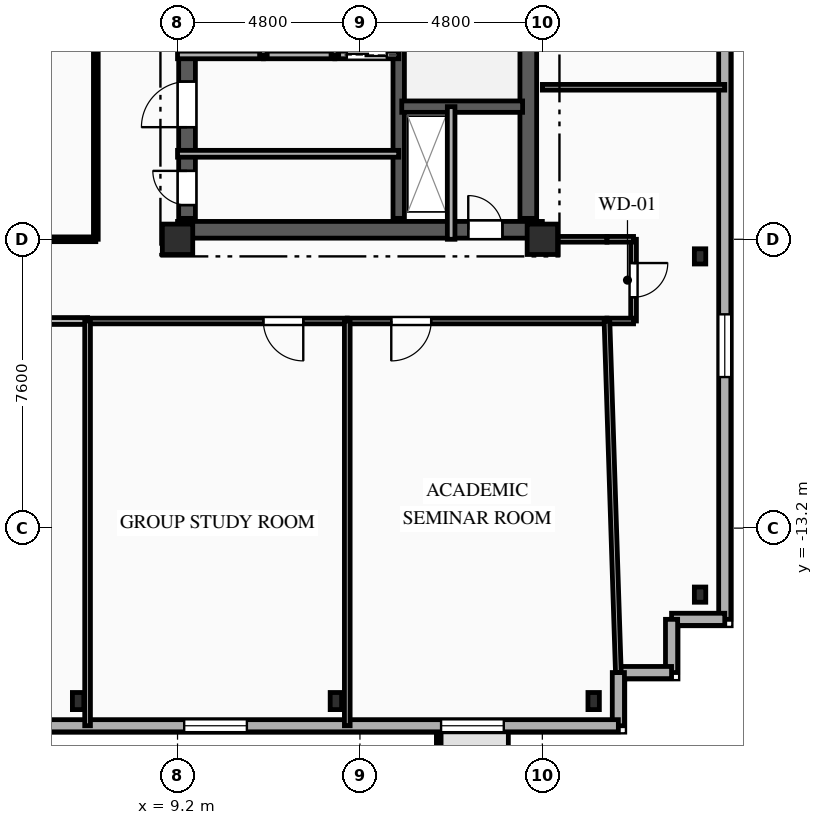
"""IFC4 building model, lengths in metres.
Left out: names, types, materials, properties, quantities, classifications, styles, units other than length and angle.
Written with IfcOpenShell. Run it as: python <this file> out.ifc"""

import sys

from ifc_helpers import new_model, si_unit, direction, frame, frame_2d, origin, origin_2d, place, context, subcontext, project, spatial, rectangle, i_section, extrude, element, fill, save


model = new_model("IFC4")
c1 = context("Model", 3, precision=1e-05, world=origin(), true_north=direction((0.0, 1.0)))
c2 = subcontext(c1, "Body", "Model", "MODEL_VIEW")
j1 = project(units=[si_unit("LENGTHUNIT", "METRE"), si_unit("PLANEANGLEUNIT", "RADIAN")], contexts=[c1])
p1 = place(None, origin())
s1 = spatial("IfcSite", under=j1, at=p1, CompositionType="ELEMENT")
p2 = place(p1, origin())
s2 = spatial("IfcBuilding", under=s1, at=p2, CompositionType="ELEMENT")
p3 = place(p2, frame((0.0, 0.0, 235.0)))
s3 = spatial("IfcBuildingStorey", under=s2, at=p3, CompositionType="ELEMENT", Elevation=235.0)
for number, where, z_axis, x_axis in (
    (1, (9.2, -5.6, 0.0), (0.0, 0.0, 1.0), (1.0, 0.0, 0.0)),
    (2, (18.8, -5.6, 0.0), (0.0, 0.0, 1.0), (1.0, 0.0, 0.0)),
):
    element("IfcColumn", number, at=place(p3, frame(where, z_axis=z_axis, x_axis=x_axis)), inside=s3, PredefinedType="COLUMN", context=c2, shape_type="SweptSolid", body=[
        extrude(rectangle(XDim=0.8, YDim=0.8, at=origin_2d()), origin(), (0.0, 0.0, 1.0), 3.35),
    ])
for number, where, z_axis, x_axis in (
    (3, (6.583, -17.75, 0.0), (0.0, 0.0, 1.0), (1.0, 0.0, 0.0)),
    (4, (13.367, -17.75, 0.0), (0.0, 0.0, 1.0), (1.0, 0.0, 0.0)),
    (5, (20.15, -17.75, 0.0), (0.0, 0.0, 1.0), (1.0, 0.0, 0.0)),
):
    element("IfcColumn", number, at=place(p3, frame(where, z_axis=z_axis, x_axis=x_axis)), inside=s3, PredefinedType="COLUMN", context=c2, shape_type="SweptSolid", body=[
        extrude(i_section(OverallWidth=0.3, OverallDepth=0.45, WebThickness=0.014, FlangeThickness=0.026, FilletRadius=0.027, at=origin_2d()), origin(), (0.0, 0.0, 1.0), 3.35),
    ])
for number, where, z_axis, x_axis in (
    (6, (22.95, -14.95, 0.0), (0.0, 0.0, 1.0), (1.0, 0.0, 0.0)),
    (7, (22.95, -6.05, 0.0), (0.0, 0.0, 1.0), (1.0, 0.0, 0.0)),
):
    element("IfcColumn", number, at=place(p3, frame(where, z_axis=z_axis, x_axis=x_axis)), inside=s3, PredefinedType="COLUMN", context=c2, shape_type="SweptSolid", body=[
        extrude(i_section(OverallWidth=0.3, OverallDepth=0.4, WebThickness=0.013, FlangeThickness=0.024, FilletRadius=0.027, at=origin_2d()), origin(), (0.0, 0.0, 1.0), 3.35),
    ])
p4 = place(p3, frame((23.6, 12.4, 0.0), z_axis=(0.0, 0.0, 1.0), x_axis=(0.0, -1.0, 0.0)))
e8 = element("IfcWall", 8, at=p4, inside=s3, PredefinedType="SOLIDWALL", context=c2, shape_type="SweptSolid", body=[
    extrude(rectangle(XDim=28.0, YDim=0.32, at=frame_2d((14.0, 0.0))), origin(), (0.0, 0.0, 1.0), 3.04),
])
p5 = place(p4, frame((6.415, 0.0, 0.85)))
e9 = element("IfcOpeningElement", 9, at=p5, cuts=e8, PredefinedType="OPENING", context=c2, shape_type="SweptSolid", body=[
    extrude(rectangle(XDim=1.65, YDim=1.85, at=frame_2d((0.825, 0.925))), frame((0.0, 0.17, 0.0), z_axis=(0.0, -1.0, 0.0), x_axis=(1.0, 0.0, 0.0)), (0.0, 0.0, 1.0), 0.34),
])
p6 = place(p4, frame((19.975, 0.0, 0.85)))
e10 = element("IfcOpeningElement", 10, at=p6, cuts=e8, PredefinedType="OPENING", context=c2, shape_type="SweptSolid", body=[
    extrude(rectangle(XDim=1.65, YDim=1.85, at=frame_2d((0.825, 0.925))), frame((0.0, 0.17, 0.0), z_axis=(0.0, -1.0, 0.0), x_axis=(1.0, 0.0, 0.0)), (0.0, 0.0, 1.0), 0.34),
])
p7 = place(p3, frame((23.6, -15.6, 0.0), z_axis=(0.0, 0.0, 1.0), x_axis=(-1.0, 0.0, 0.0)))
e11 = element("IfcWall", 11, at=p7, inside=s3, PredefinedType="SOLIDWALL", context=c2, shape_type="SweptSolid", body=[
    extrude(rectangle(XDim=1.4, YDim=0.32, at=frame_2d((0.7, 0.0))), origin(), (0.0, 0.0, 1.0), 3.04),
])
for number, where, z_axis, x_axis in (
    (12, (22.2, -15.6, 0.0), (0.0, 0.0, 1.0), (0.0, -1.0, 0.0)),
    (13, (22.2, -17.0, 0.0), (0.0, 0.0, 1.0), (-1.0, 0.0, 0.0)),
    (14, (20.8, -17.0, 0.0), (0.0, 0.0, 1.0), (0.0, -1.0, 0.0)),
):
    element("IfcWall", number, at=place(p3, frame(where, z_axis=z_axis, x_axis=x_axis)), inside=s3, PredefinedType="SOLIDWALL", context=c2, shape_type="SweptSolid", body=[
        extrude(rectangle(XDim=1.4, YDim=0.32, at=frame_2d((0.7, 0.0))), origin(), (0.0, 0.0, 1.0), 3.04),
    ])
p8 = place(p3, frame((20.8, -18.4, 0.0), z_axis=(0.0, 0.0, 1.0), x_axis=(-1.0, 0.0, 0.0)))
e15 = element("IfcWall", 15, at=p8, inside=s3, PredefinedType="SOLIDWALL", context=c2, shape_type="SweptSolid", body=[
    extrude(rectangle(XDim=42.0, YDim=0.32, at=frame_2d((21.0, 0.0))), origin(), (0.0, 0.0, 1.0), 3.04),
])
p9 = place(p8, frame((3.015, 0.0, 0.85)))
e16 = element("IfcOpeningElement", 16, at=p9, cuts=e15, PredefinedType="OPENING", context=c2, shape_type="SweptSolid", body=[
    extrude(rectangle(XDim=1.65, YDim=1.85, at=frame_2d((0.825, 0.925))), frame((0.0, 0.17, 0.0), z_axis=(0.0, -1.0, 0.0), x_axis=(1.0, 0.0, 0.0)), (0.0, 0.0, 1.0), 0.34),
])
p10 = place(p8, frame((9.775, 0.0, 0.85)))
e17 = element("IfcOpeningElement", 17, at=p10, cuts=e15, PredefinedType="OPENING", context=c2, shape_type="SweptSolid", body=[
    extrude(rectangle(XDim=1.65, YDim=1.85, at=frame_2d((0.825, 0.925))), frame((0.0, 0.17, 0.0), z_axis=(0.0, -1.0, 0.0), x_axis=(1.0, 0.0, 0.0)), (0.0, 0.0, 1.0), 0.34),
])
p11 = place(p8, frame((19.74, 0.0, 0.85)))
e18 = element("IfcOpeningElement", 18, at=p11, cuts=e15, PredefinedType="OPENING", context=c2, shape_type="SweptSolid", body=[
    extrude(rectangle(XDim=2.2, YDim=1.85, at=frame_2d((1.1, 0.925))), frame((0.0, 0.17, 0.0), z_axis=(0.0, -1.0, 0.0), x_axis=(1.0, 0.0, 0.0)), (0.0, 0.0, 1.0), 0.34),
])
p12 = place(p8, frame((30.255, 0.0, 0.85)))
e19 = element("IfcOpeningElement", 19, at=p12, cuts=e15, PredefinedType="OPENING", context=c2, shape_type="SweptSolid", body=[
    extrude(rectangle(XDim=1.65, YDim=1.85, at=frame_2d((0.825, 0.925))), frame((0.0, 0.17, 0.0), z_axis=(0.0, -1.0, 0.0), x_axis=(1.0, 0.0, 0.0)), (0.0, 0.0, 1.0), 0.34),
])
p13 = place(p8, frame((37.095, 0.0, 0.85)))
e20 = element("IfcOpeningElement", 20, at=p13, cuts=e15, PredefinedType="OPENING", context=c2, shape_type="SweptSolid", body=[
    extrude(rectangle(XDim=1.65, YDim=1.85, at=frame_2d((0.825, 0.925))), frame((0.0, 0.17, 0.0), z_axis=(0.0, -1.0, 0.0), x_axis=(1.0, 0.0, 0.0)), (0.0, 0.0, 1.0), 0.34),
])
p14 = place(p3, frame((9.2, -5.35, 0.0), z_axis=(0.0, 0.0, 1.0), x_axis=(1.0, 0.0, 0.0)))
e21 = element("IfcWall", 21, at=p14, inside=s3, PredefinedType="SHEAR", context=c2, shape_type="SweptSolid", body=[
    extrude(rectangle(XDim=9.6, YDim=0.44, at=frame_2d((4.8, 0.0))), origin(), (0.0, 0.0, 1.0), 3.04),
])
p15 = place(p14, frame((7.65, 0.0, 0.0)))
e22 = element("IfcOpeningElement", 22, at=p15, cuts=e21, PredefinedType="OPENING", context=c2, shape_type="SweptSolid", body=[
    extrude(rectangle(XDim=0.9, YDim=2.1, at=frame_2d((0.45, 1.05))), frame((0.0, 0.23, 0.0), z_axis=(0.0, -1.0, 0.0), x_axis=(1.0, 0.0, 0.0)), (0.0, 0.0, 1.0), 0.46),
])
p16 = place(p3, frame((9.45, -5.05, 0.0), z_axis=(0.0, 0.0, 1.0), x_axis=(0.0, 1.0, 0.0)))
e23 = element("IfcWall", 23, at=p16, inside=s3, PredefinedType="SHEAR", context=c2, shape_type="SweptSolid", body=[
    extrude(rectangle(XDim=10.1, YDim=0.44, at=frame_2d((5.05, 0.0))), origin(), (0.0, 0.0, 1.0), 3.04),
])
p17 = place(p16, frame((7.15, 0.0, 0.0)))
e24 = element("IfcOpeningElement", 24, at=p17, cuts=e23, PredefinedType="OPENING", context=c2, shape_type="SweptSolid", body=[
    extrude(rectangle(XDim=0.9, YDim=2.1, at=frame_2d((0.45, 1.05))), frame((0.0, 0.23, 0.0), z_axis=(0.0, -1.0, 0.0), x_axis=(1.0, 0.0, 0.0)), (0.0, 0.0, 1.0), 0.46),
])
p18 = place(p16, frame((2.4, 0.0, 0.0)))
e25 = element("IfcOpeningElement", 25, at=p18, cuts=e23, PredefinedType="OPENING", context=c2, shape_type="SweptSolid", body=[
    extrude(rectangle(XDim=1.2, YDim=2.15, at=frame_2d((0.6, 1.075))), frame((0.0, 0.23, 0.0), z_axis=(0.0, -1.0, 0.0), x_axis=(1.0, 0.0, 0.0)), (0.0, 0.0, 1.0), 0.46),
])
p19 = place(p16, frame((0.35, 0.0, 0.0)))
e26 = element("IfcOpeningElement", 26, at=p19, cuts=e23, PredefinedType="OPENING", context=c2, shape_type="SweptSolid", body=[
    extrude(rectangle(XDim=0.9, YDim=2.1, at=frame_2d((0.45, 1.05))), frame((0.0, 0.23, 0.0), z_axis=(0.0, -1.0, 0.0), x_axis=(1.0, 0.0, 0.0)), (0.0, 0.0, 1.0), 0.46),
])
p20 = place(p3, frame((18.43, -5.05, 0.0), z_axis=(0.0, 0.0, 1.0), x_axis=(0.0, 1.0, 0.0)))
e27 = element("IfcWall", 27, at=p20, inside=s3, PredefinedType="SHEAR", context=c2, shape_type="SweptSolid", body=[
    extrude(rectangle(XDim=10.1, YDim=0.44, at=frame_2d((5.05, 0.0))), origin(), (0.0, 0.0, 1.0), 3.04),
])
p21 = place(p3, frame((15.02, -5.05, 0.0), z_axis=(0.0, 0.0, 1.0), x_axis=(0.0, 1.0, 0.0)))
e28 = element("IfcWall", 28, at=p21, inside=s3, PredefinedType="SHEAR", context=c2, shape_type="SweptSolid", body=[
    extrude(rectangle(XDim=10.1, YDim=0.3, at=frame_2d((5.05, 0.0))), origin(), (0.0, 0.0, 1.0), 3.04),
])
p22 = place(p3, frame((15.1, -2.11, 0.0), z_axis=(0.0, 0.0, 1.0), x_axis=(1.0, 0.0, 0.0)))
e29 = element("IfcWall", 29, at=p22, inside=s3, PredefinedType="SHEAR", context=c2, shape_type="SweptSolid", body=[
    extrude(rectangle(XDim=3.18, YDim=0.3, at=frame_2d((1.59, 0.0))), origin(), (0.0, 0.0, 1.0), 3.04),
])
p23 = place(p3, frame((16.4, -2.11, 0.0), z_axis=(0.0, 0.0, 1.0), x_axis=(0.0, -1.0, 0.0)))
e30 = element("IfcWall", 30, at=p23, inside=s3, PredefinedType="PARTITIONING", context=c2, shape_type="SweptSolid", body=[
    extrude(rectangle(XDim=3.49, YDim=0.2, at=frame_2d((1.745, 0.0))), origin(), (0.0, 0.0, 1.0), 3.04),
])
p24 = place(p3, frame((9.2, -3.35, 0.0), z_axis=(0.0, 0.0, 1.0), x_axis=(1.0, 0.0, 0.0)))
e31 = element("IfcWall", 31, at=p24, inside=s3, PredefinedType="PARTITIONING", context=c2, shape_type="SweptSolid", body=[
    extrude(rectangle(XDim=5.82, YDim=0.18, at=frame_2d((2.91, 0.0))), origin(), (0.0, 0.0, 1.0), 2.755),
])
p25 = place(p3, frame((11.46, -0.75, 0.0), z_axis=(0.0, 0.0, 1.0), x_axis=(-1.0, 0.0, 0.0)))
e32 = element("IfcWall", 32, at=p25, inside=s3, PredefinedType="PARTITIONING", context=c2, shape_type="SweptSolid", body=[
    extrude(rectangle(XDim=2.26, YDim=0.2, at=frame_2d((1.13, 0.0))), origin(), (0.0, 0.0, 1.0), 3.04),
])
p26 = place(p3, frame((13.34, -0.75, 0.0), z_axis=(0.0, 0.0, 1.0), x_axis=(-1.0, 0.0, 0.0)))
e33 = element("IfcWall", 33, at=p26, inside=s3, PredefinedType="PARTITIONING", context=c2, shape_type="SweptSolid", body=[
    extrude(rectangle(XDim=1.88, YDim=0.2, at=frame_2d((0.94, 0.0))), origin(), (0.0, 0.0, 1.0), 3.04),
])
p27 = place(p3, frame((15.02, -0.75, 0.0), z_axis=(0.0, 0.0, 1.0), x_axis=(-1.0, 0.0, 0.0)))
e34 = element("IfcWall", 34, at=p27, inside=s3, PredefinedType="PARTITIONING", context=c2, shape_type="SweptSolid", body=[
    extrude(rectangle(XDim=1.68, YDim=0.2, at=frame_2d((0.84, 0.0))), origin(), (0.0, 0.0, 1.0), 3.04),
])
p28 = place(p27, frame((0.315, 0.0, 0.0)))
e35 = element("IfcOpeningElement", 35, at=p28, cuts=e34, PredefinedType="OPENING", context=c2, shape_type="SweptSolid", body=[
    extrude(rectangle(XDim=1.05, YDim=2.1, at=frame_2d((0.525, 1.05))), frame((0.0, 0.11, 0.0), z_axis=(0.0, -1.0, 0.0), x_axis=(1.0, 0.0, 0.0)), (0.0, 0.0, 1.0), 0.22),
])
for number, where, z_axis, x_axis in (
    (36, (11.46, -0.75, 0.0), (0.0, 0.0, 1.0), (0.0, 1.0, 0.0)),
    (37, (13.34, -0.75, 0.0), (0.0, 0.0, 1.0), (0.0, 1.0, 0.0)),
):
    element("IfcWall", number, at=place(p3, frame(where, z_axis=z_axis, x_axis=x_axis)), inside=s3, PredefinedType="PARTITIONING", context=c2, shape_type="SweptSolid", body=[
        extrude(rectangle(XDim=2.3, YDim=0.2, at=frame_2d((1.15, 0.0))), origin(), (0.0, 0.0, 1.0), 3.04),
    ])
p29 = place(p3, frame((21.2, -5.6, 0.0), z_axis=(0.0, 0.0, 1.0), x_axis=(0.0, -1.0, 0.0)))
e38 = element("IfcWall", 38, at=p29, inside=s3, PredefinedType="PARTITIONING", context=c2, shape_type="SweptSolid", body=[
    extrude(rectangle(XDim=2.15, YDim=0.15, at=frame_2d((1.075, 0.0))), origin(), (0.0, 0.0, 1.0), 3.04),
])
p30 = place(p29, frame((0.625, 0.0, 0.0)))
e39 = element("IfcOpeningElement", 39, at=p30, cuts=e38, PredefinedType="OPENING", context=c2, shape_type="SweptSolid", body=[
    extrude(rectangle(XDim=0.9, YDim=2.1, at=frame_2d((0.45, 1.05))), frame((0.0, 0.085, 0.0), z_axis=(0.0, -1.0, 0.0), x_axis=(1.0, 0.0, 0.0)), (0.0, 0.0, 1.0), 0.17),
])
p31 = place(p3, frame((18.8, -5.6, 0.0), z_axis=(0.0, 0.0, 1.0), x_axis=(1.0, 0.0, 0.0)))
e40 = element("IfcWall", 40, at=p31, inside=s3, PredefinedType="PARTITIONING", context=c2, shape_type="SweptSolid", body=[
    extrude(rectangle(XDim=1.7, YDim=0.15, at=frame_2d((0.85, 0.0))), origin(), (0.0, 0.0, 1.0), 3.04),
])
for number, where, z_axis, x_axis in (
    (41, (20.5, -5.6, 0.0), (0.0, 0.0, 1.0), (1.0, 0.0, 0.0)),
    (42, (21.2, -7.75, 0.0), (0.0, 0.0, 1.0), (-1.0, 0.0, 0.0)),
):
    element("IfcWall", number, at=place(p3, frame(where, z_axis=z_axis, x_axis=x_axis)), inside=s3, PredefinedType="PARTITIONING", context=c2, shape_type="SweptSolid", body=[
        extrude(rectangle(XDim=0.7, YDim=0.15, at=frame_2d((0.35, 0.0))), origin(), (0.0, 0.0, 1.0), 3.04),
    ])
p32 = place(p3, frame((6.833, -7.75, 0.0), z_axis=(0.0, 0.0, 1.0), x_axis=(-1.0, 0.0, 0.0)))
e43 = element("IfcWall", 43, at=p32, inside=s3, PredefinedType="PARTITIONING", context=c2, shape_type="SweptSolid", body=[
    extrude(rectangle(XDim=6.833, YDim=0.18, at=frame_2d((3.417, 0.0))), origin(), (0.0, 0.0, 1.0), 3.04),
])
p33 = place(p32, frame((4.669, 0.0, 0.0)))
e44 = element("IfcOpeningElement", 44, at=p33, cuts=e43, PredefinedType="OPENING", context=c2, shape_type="SweptSolid", body=[
    extrude(rectangle(XDim=1.0, YDim=2.15, at=frame_2d((0.5, 1.075))), frame((0.0, 0.1, 0.0), z_axis=(0.0, -1.0, 0.0), x_axis=(1.0, 0.0, 0.0)), (0.0, 0.0, 1.0), 0.2),
])
p34 = place(p3, frame((13.667, -7.75, 0.0), z_axis=(0.0, 0.0, 1.0), x_axis=(-1.0, 0.0, 0.0)))
e45 = element("IfcWall", 45, at=p34, inside=s3, PredefinedType="PARTITIONING", context=c2, shape_type="SweptSolid", body=[
    extrude(rectangle(XDim=6.833, YDim=0.15, at=frame_2d((3.417, 0.0))), origin(), (0.0, 0.0, 1.0), 3.04),
])
p35 = place(p34, frame((1.158, 0.0, 0.0)))
e46 = element("IfcOpeningElement", 46, at=p35, cuts=e45, PredefinedType="OPENING", context=c2, shape_type="SweptSolid", body=[
    extrude(rectangle(XDim=1.05, YDim=2.15, at=frame_2d((0.525, 1.075))), frame((0.0, 0.085, 0.0), z_axis=(0.0, -1.0, 0.0), x_axis=(1.0, 0.0, 0.0)), (0.0, 0.0, 1.0), 0.17),
])
p36 = place(p3, frame((20.5, -7.75, 0.0), z_axis=(0.0, 0.0, 1.0), x_axis=(-1.0, 0.0, 0.0)))
e47 = element("IfcWall", 47, at=p36, inside=s3, PredefinedType="PARTITIONING", context=c2, shape_type="SweptSolid", body=[
    extrude(rectangle(XDim=6.833, YDim=0.15, at=frame_2d((3.417, 0.0))), origin(), (0.0, 0.0, 1.0), 3.04),
])
p37 = place(p36, frame((4.625, 0.0, 0.0)))
e48 = element("IfcOpeningElement", 48, at=p37, cuts=e47, PredefinedType="OPENING", context=c2, shape_type="SweptSolid", body=[
    extrude(rectangle(XDim=1.05, YDim=2.15, at=frame_2d((0.525, 1.075))), frame((0.0, 0.085, 0.0), z_axis=(0.0, -1.0, 0.0), x_axis=(1.0, 0.0, 0.0)), (0.0, 0.0, 1.0), 0.17),
])
p38 = place(p3, frame((0.0, -5.6, 0.0), z_axis=(0.0, 0.0, 1.0), x_axis=(1.0, 0.0, 0.0)))
e49 = element("IfcWall", 49, at=p38, inside=s3, PredefinedType="PARTITIONING", context=c2, shape_type="SweptSolid", body=[
    extrude(rectangle(XDim=7.05, YDim=0.125, at=frame_2d((3.525, 0.0))), origin(), (0.0, 0.0, 1.0), 2.525),
])
p39 = place(p3, frame((7.05, -5.6, 0.0), z_axis=(0.0, 0.0, 1.0), x_axis=(0.0, 1.0, 0.0)))
e50 = element("IfcWall", 50, at=p39, inside=s3, PredefinedType="PARTITIONING", context=c2, shape_type="SweptSolid", body=[
    extrude(rectangle(XDim=14.1, YDim=0.125, at=frame_2d((7.05, 0.0))), origin(), (0.0, 0.0, 1.0), 3.04),
])
p40 = place(p39, frame((5.076, 0.0, 0.0)))
e51 = element("IfcOpeningElement", 51, at=p40, cuts=e50, PredefinedType="OPENING", context=c2, shape_type="SweptSolid", body=[
    extrude(rectangle(XDim=0.95, YDim=2.1, at=frame_2d((0.475, 1.05))), frame((0.0, 0.073, 0.0), z_axis=(0.0, -1.0, 0.0), x_axis=(1.0, 0.0, 0.0)), (0.0, 0.0, 1.0), 0.145),
])
p41 = place(p3, frame((18.8, -1.6, 0.0), z_axis=(0.0, 0.0, 1.0), x_axis=(1.0, 0.0, 0.0)))
e52 = element("IfcWall", 52, at=p41, inside=s3, PredefinedType="PARTITIONING", context=c2, shape_type="SweptSolid", body=[
    extrude(rectangle(XDim=4.8, YDim=0.15, at=frame_2d((2.4, 0.0))), origin(), (0.0, 0.0, 1.0), 3.04),
])
p42 = place(p3, frame((20.8, -17.0, 0.0), z_axis=(0.0, 0.0, 1.0), x_axis=(-0.032420659042, 0.99947431226, 0.0)))
e53 = element("IfcWall", 53, at=p42, inside=s3, PredefinedType="PARTITIONING", context=c2, shape_type="SweptSolid", body=[
    extrude(rectangle(XDim=9.255, YDim=0.15, at=frame_2d((4.627, 0.0))), origin(), (0.0, 0.0, 1.0), 3.04),
])
p43 = place(p3, frame((6.833, -7.75, 0.0), z_axis=(0.0, 0.0, 1.0), x_axis=(0.0, -1.0, 0.0)))
e54 = element("IfcWall", 54, at=p43, inside=s3, PredefinedType="PARTITIONING", context=c2, shape_type="SweptSolid", body=[
    extrude(rectangle(XDim=10.65, YDim=0.15, at=frame_2d((5.325, 0.0))), origin(), (0.0, 0.0, 1.0), 2.665),
])
p44 = place(p3, frame((13.667, -7.75, 0.0), z_axis=(0.0, 0.0, 1.0), x_axis=(0.0, -1.0, 0.0)))
e55 = element("IfcWall", 55, at=p44, inside=s3, PredefinedType="PARTITIONING", context=c2, shape_type="SweptSolid", body=[
    extrude(rectangle(XDim=10.65, YDim=0.15, at=frame_2d((5.325, 0.0))), origin(), (0.0, 0.0, 1.0), 3.04),
])
p45 = place(p6, origin())
e56 = element("IfcWindow", 56, at=p45, inside=s3, PartitioningType="SINGLE_PANEL", PredefinedType="WINDOW", context=c2, shape_type="SweptSolid", body=[
    extrude(rectangle(XDim=1.65, YDim=1.85, at=frame_2d((0.825, 0.925))), frame((0.0, 0.03, 0.0), z_axis=(0.0, -1.0, 0.0), x_axis=(1.0, 0.0, 0.0)), (0.0, 0.0, 1.0), 0.06),
])
fill(e10, e56)
p46 = place(p9, origin())
e57 = element("IfcWindow", 57, at=p46, inside=s3, PartitioningType="SINGLE_PANEL", PredefinedType="WINDOW", context=c2, shape_type="SweptSolid", body=[
    extrude(rectangle(XDim=1.65, YDim=1.85, at=frame_2d((0.825, 0.925))), frame((0.0, 0.03, 0.0), z_axis=(0.0, -1.0, 0.0), x_axis=(1.0, 0.0, 0.0)), (0.0, 0.0, 1.0), 0.06),
])
fill(e16, e57)
p47 = place(p10, origin())
e58 = element("IfcWindow", 58, at=p47, inside=s3, PartitioningType="SINGLE_PANEL", PredefinedType="WINDOW", context=c2, shape_type="SweptSolid", body=[
    extrude(rectangle(XDim=1.65, YDim=1.85, at=frame_2d((0.825, 0.925))), frame((0.0, 0.03, 0.0), z_axis=(0.0, -1.0, 0.0), x_axis=(1.0, 0.0, 0.0)), (0.0, 0.0, 1.0), 0.06),
])
fill(e17, e58)
p48 = place(p15, origin())
e59 = element("IfcDoor", 59, at=p48, inside=s3, OperationType="SINGLE_SWING_LEFT", PredefinedType="DOOR", context=c2, shape_type="SweptSolid", body=[
    extrude(rectangle(XDim=0.9, YDim=2.1, at=frame_2d((0.45, 1.05))), frame((0.0, 0.025, 0.0), z_axis=(0.0, -1.0, 0.0), x_axis=(1.0, 0.0, 0.0)), (0.0, 0.0, 1.0), 0.05),
])
fill(e22, e59)
p49 = place(p28, origin())
e60 = element("IfcDoor", 60, at=p49, inside=s3, OperationType="DOUBLE_DOOR_SLIDING", PredefinedType="DOOR", context=c2, shape_type="SweptSolid", body=[
    extrude(rectangle(XDim=1.05, YDim=2.1, at=frame_2d((0.525, 1.05))), frame((0.0, 0.025, 0.0), z_axis=(0.0, -1.0, 0.0), x_axis=(1.0, 0.0, 0.0)), (0.0, 0.0, 1.0), 0.05),
])
fill(e35, e60)
p50 = place(p18, origin())
e61 = element("IfcDoor", 61, at=p50, inside=s3, OperationType="SINGLE_SWING_LEFT", PredefinedType="DOOR", context=c2, shape_type="SweptSolid", body=[
    extrude(rectangle(XDim=1.2, YDim=2.15, at=frame_2d((0.6, 1.075))), frame((0.0, 0.025, 0.0), z_axis=(0.0, -1.0, 0.0), x_axis=(1.0, 0.0, 0.0)), (0.0, 0.0, 1.0), 0.05),
])
fill(e25, e61)
p51 = place(p19, origin())
e62 = element("IfcDoor", 62, at=p51, inside=s3, OperationType="SINGLE_SWING_RIGHT", PredefinedType="DOOR", context=c2, shape_type="SweptSolid", body=[
    extrude(rectangle(XDim=0.9, YDim=2.1, at=frame_2d((0.45, 1.05))), frame((0.0, 0.025, 0.0), z_axis=(0.0, -1.0, 0.0), x_axis=(1.0, 0.0, 0.0)), (0.0, 0.0, 1.0), 0.05),
])
fill(e26, e62)
p52 = place(p30, origin())
e63 = element("IfcDoor", 63, at=p52, inside=s3, OperationType="SINGLE_SWING_LEFT", PredefinedType="DOOR", context=c2, shape_type="SweptSolid", body=[
    extrude(rectangle(XDim=0.9, YDim=2.1, at=frame_2d((0.45, 1.05))), frame((0.0, 0.025, 0.0), z_axis=(0.0, -1.0, 0.0), x_axis=(1.0, 0.0, 0.0)), (0.0, 0.0, 1.0), 0.05),
])
fill(e39, e63)
p53 = place(p35, origin())
e64 = element("IfcDoor", 64, at=p53, inside=s3, OperationType="SINGLE_SWING_LEFT", PredefinedType="DOOR", context=c2, shape_type="SweptSolid", body=[
    extrude(rectangle(XDim=1.05, YDim=2.15, at=frame_2d((0.525, 1.075))), frame((0.0, 0.025, 0.0), z_axis=(0.0, -1.0, 0.0), x_axis=(1.0, 0.0, 0.0)), (0.0, 0.0, 1.0), 0.05),
])
fill(e46, e64)
p54 = place(p37, origin())
e65 = element("IfcDoor", 65, at=p54, inside=s3, OperationType="SINGLE_SWING_RIGHT", PredefinedType="DOOR", context=c2, shape_type="SweptSolid", body=[
    extrude(rectangle(XDim=1.05, YDim=2.15, at=frame_2d((0.525, 1.075))), frame((0.0, 0.025, 0.0), z_axis=(0.0, -1.0, 0.0), x_axis=(1.0, 0.0, 0.0)), (0.0, 0.0, 1.0), 0.05),
])
fill(e48, e65)
save(model, sys.argv[1])
